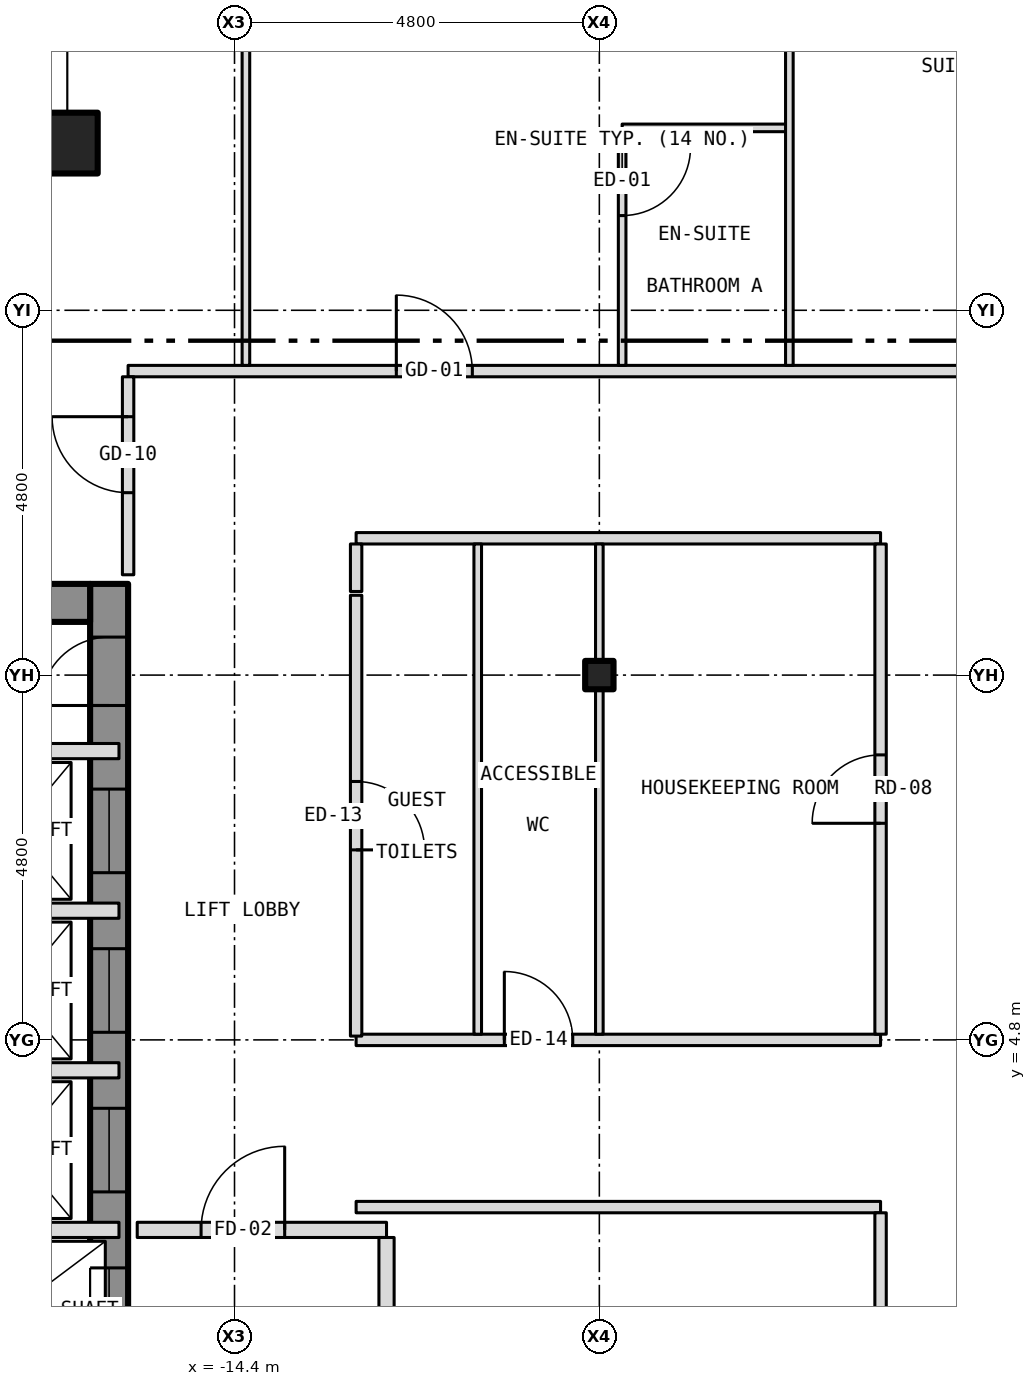
"""IFC4 building model, lengths in metres.
Left out: names, types, materials, properties, quantities, classifications, styles, units other than length and angle.
Written with IfcOpenShell. Run it as: python <this file> out.ifc"""

import sys

from ifc_helpers import new_model, si_unit, direction, frame, frame_2d, origin, origin_2d, place, context, subcontext, project, spatial, rectangle, hollow_rectangle, i_section, extrude, element, fill, save


model = new_model("IFC4")
c1 = context("Model", 3, precision=1e-05, world=origin(), true_north=direction((0.0, 1.0)))
c2 = subcontext(c1, "Body", "Model", "MODEL_VIEW")
j1 = project(units=[si_unit("LENGTHUNIT", "METRE"), si_unit("PLANEANGLEUNIT", "RADIAN")], contexts=[c1])
p1 = place(None, origin())
s1 = spatial("IfcSite", under=j1, at=p1, CompositionType="ELEMENT")
p2 = place(p1, origin())
s2 = spatial("IfcBuilding", under=s1, at=p2, CompositionType="ELEMENT")
p3 = place(p2, frame((0.0, 0.0, 151.5)))
s3 = spatial("IfcBuildingStorey", under=s2, at=p3, CompositionType="ELEMENT", Elevation=151.5)
p4 = place(p3, frame((-16.6, 16.6, -0.15), z_axis=(0.0, 0.0, 1.0), x_axis=(1.0, 0.0, 0.0)))
e1 = element("IfcColumn", 1, at=p4, inside=s3, PredefinedType="COLUMN", context=c2, shape_type="SweptSolid", body=[
    extrude(hollow_rectangle(XDim=0.8, YDim=0.8, WallThickness=0.045, at=origin_2d()), origin(), (0.0, 0.0, 1.0), 3.5),
])
p5 = place(p3, frame((-9.6, 9.6, -0.15), z_axis=(0.0, 0.0, 1.0), x_axis=(1.0, 0.0, 0.0)))
e2 = element("IfcColumn", 2, at=p5, inside=s3, PredefinedType="COLUMN", context=c2, shape_type="SweptSolid", body=[
    extrude(i_section(OverallWidth=0.373, OverallDepth=0.373, WebThickness=0.016, FlangeThickness=0.026, at=origin_2d()), origin(), (0.0, 0.0, 1.0), 3.5),
])
p6 = place(p3, frame((-16.05, -10.8, 0.0), z_axis=(0.0, 0.0, 1.0), x_axis=(0.0, 1.0, 0.0)))
e3 = element("IfcWall", 3, at=p6, inside=s3, PredefinedType="SHEAR", context=c2, shape_type="SweptSolid", body=[
    extrude(rectangle(XDim=21.6, YDim=0.5, at=frame_2d((10.8, 0.0))), origin(), (0.0, 0.0, 1.0), 3.25),
])
p7 = place(p6, frame((9.4, 0.0, 0.0)))
e4 = element("IfcOpeningElement", 4, at=p7, cuts=e3, PredefinedType="OPENING", context=c2, shape_type="SweptSolid", body=[
    extrude(rectangle(XDim=1.1, YDim=2.1, at=frame_2d((0.55, 1.05))), frame((0.0, 0.262, 0.0), z_axis=(0.0, -1.0, 0.0), x_axis=(1.0, 0.0, 0.0)), (0.0, 0.0, 1.0), 0.524),
])
p8 = place(p6, frame((11.5, 0.0, 0.0)))
e5 = element("IfcOpeningElement", 5, at=p8, cuts=e3, PredefinedType="OPENING", context=c2, shape_type="SweptSolid", body=[
    extrude(rectangle(XDim=1.1, YDim=2.1, at=frame_2d((0.55, 1.05))), frame((0.0, 0.262, 0.0), z_axis=(0.0, -1.0, 0.0), x_axis=(1.0, 0.0, 0.0)), (0.0, 0.0, 1.0), 0.524),
])
p9 = place(p6, frame((13.6, 0.0, 0.0)))
e6 = element("IfcOpeningElement", 6, at=p9, cuts=e3, PredefinedType="OPENING", context=c2, shape_type="SweptSolid", body=[
    extrude(rectangle(XDim=1.1, YDim=2.1, at=frame_2d((0.55, 1.05))), frame((0.0, 0.262, 0.0), z_axis=(0.0, -1.0, 0.0), x_axis=(1.0, 0.0, 0.0)), (0.0, 0.0, 1.0), 0.524),
])
p10 = place(p6, frame((15.7, 0.0, 0.0)))
e7 = element("IfcOpeningElement", 7, at=p10, cuts=e3, PredefinedType="OPENING", context=c2, shape_type="SweptSolid", body=[
    extrude(rectangle(XDim=1.1, YDim=2.1, at=frame_2d((0.55, 1.05))), frame((0.0, 0.262, 0.0), z_axis=(0.0, -1.0, 0.0), x_axis=(1.0, 0.0, 0.0)), (0.0, 0.0, 1.0), 0.524),
])
p11 = place(p6, frame((17.8, 0.0, 0.0)))
e8 = element("IfcOpeningElement", 8, at=p11, cuts=e3, PredefinedType="OPENING", context=c2, shape_type="SweptSolid", body=[
    extrude(rectangle(XDim=1.1, YDim=2.1, at=frame_2d((0.55, 1.05))), frame((0.0, 0.262, 0.0), z_axis=(0.0, -1.0, 0.0), x_axis=(1.0, 0.0, 0.0)), (0.0, 0.0, 1.0), 0.524),
])
p12 = place(p6, frame((0.758, 0.0, 0.0)))
e9 = element("IfcOpeningElement", 9, at=p12, cuts=e3, PredefinedType="OPENING", context=c2, shape_type="SweptSolid", body=[
    extrude(rectangle(XDim=1.1, YDim=2.1, at=frame_2d((0.55, 1.05))), frame((0.0, 0.262, 0.0), z_axis=(0.0, -1.0, 0.0), x_axis=(1.0, 0.0, 0.0)), (0.0, 0.0, 1.0), 0.524),
])
p13 = place(p6, frame((7.5, 0.0, 0.0)))
e10 = element("IfcOpeningElement", 10, at=p13, cuts=e3, PredefinedType="OPENING", context=c2, shape_type="SweptSolid", body=[
    extrude(rectangle(XDim=1.1, YDim=2.1, at=frame_2d((0.55, 1.05))), frame((0.0, 0.262, 0.0), z_axis=(0.0, -1.0, 0.0), x_axis=(1.0, 0.0, 0.0)), (0.0, 0.0, 1.0), 0.524),
])
p14 = place(p6, frame((20.0, 0.0, 0.0)))
e11 = element("IfcOpeningElement", 11, at=p14, cuts=e3, PredefinedType="OPENING", context=c2, shape_type="SweptSolid", body=[
    extrude(rectangle(XDim=0.9, YDim=2.1, at=frame_2d((0.45, 1.05))), frame((0.0, 0.262, 0.0), z_axis=(0.0, -1.0, 0.0), x_axis=(1.0, 0.0, 0.0)), (0.0, 0.0, 1.0), 0.524),
])
p15 = place(p3, frame((-21.1, 10.55, 0.0), z_axis=(0.0, 0.0, 1.0), x_axis=(1.0, 0.0, 0.0)))
e12 = element("IfcWall", 12, at=p15, inside=s3, PredefinedType="SHEAR", context=c2, shape_type="SweptSolid", body=[
    extrude(rectangle(XDim=4.8, YDim=0.5, at=frame_2d((2.4, 0.0))), origin(), (0.0, 0.0, 1.0), 3.25),
])
p16 = place(p3, frame((-18.8, 2.3, 0.0), z_axis=(0.0, 0.0, 1.0), x_axis=(1.0, 0.0, 0.0)))
e13 = element("IfcWall", 13, at=p16, inside=s3, PredefinedType="PARTITIONING", context=c2, shape_type="SweptSolid", body=[
    extrude(rectangle(XDim=2.88, YDim=0.2, at=frame_2d((1.44, 0.0))), origin(), (0.0, 0.0, 1.0), 3.25),
])
p17 = place(p3, frame((-15.68, 2.3, 0.0), z_axis=(0.0, 0.0, 1.0), x_axis=(1.0, 0.0, 0.0)))
e14 = element("IfcWall", 14, at=p17, inside=s3, PredefinedType="PARTITIONING", context=c2, shape_type="SweptSolid", body=[
    extrude(rectangle(XDim=3.28, YDim=0.2, at=frame_2d((1.64, 0.0))), origin(), (0.0, 0.0, 1.0), 3.35),
])
p18 = place(p17, frame((0.84, 0.0, 0.0)))
e15 = element("IfcOpeningElement", 15, at=p18, cuts=e14, PredefinedType="OPENING", context=c2, shape_type="SweptSolid", body=[
    extrude(rectangle(XDim=1.1, YDim=2.1, at=frame_2d((0.55, 1.05))), frame((0.0, 0.112, 0.0), z_axis=(0.0, -1.0, 0.0), x_axis=(1.0, 0.0, 0.0)), (0.0, 0.0, 1.0), 0.224),
])
p19 = place(p3, frame((-12.8, 2.6, 0.0), z_axis=(0.0, 0.0, 1.0), x_axis=(1.0, 0.0, 0.0)))
e16 = element("IfcWall", 16, at=p19, inside=s3, PredefinedType="PARTITIONING", context=c2, shape_type="SweptSolid", body=[
    extrude(rectangle(XDim=6.9, YDim=0.15, at=frame_2d((3.45, 0.0))), origin(), (0.0, 0.0, 1.0), 3.35),
])
p20 = place(p3, frame((-18.8, 4.4, 0.0), z_axis=(0.0, 0.0, 1.0), x_axis=(1.0, 0.0, 0.0)))
e17 = element("IfcWall", 17, at=p20, inside=s3, PredefinedType="PARTITIONING", context=c2, shape_type="SweptSolid", body=[
    extrude(rectangle(XDim=2.88, YDim=0.2, at=frame_2d((1.44, 0.0))), origin(), (0.0, 0.0, 1.0), 3.25),
])
p21 = place(p3, frame((-12.8, 4.8, 0.0), z_axis=(0.0, 0.0, 1.0), x_axis=(1.0, 0.0, 0.0)))
e18 = element("IfcWall", 18, at=p21, inside=s3, PredefinedType="PARTITIONING", context=c2, shape_type="SweptSolid", body=[
    extrude(rectangle(XDim=6.9, YDim=0.15, at=frame_2d((3.45, 0.0))), origin(), (0.0, 0.0, 1.0), 3.35),
])
p22 = place(p21, frame((1.95, 0.0, 0.0)))
e19 = element("IfcOpeningElement", 19, at=p22, cuts=e18, PredefinedType="OPENING", context=c2, shape_type="SweptSolid", body=[
    extrude(rectangle(XDim=0.9, YDim=2.1, at=frame_2d((0.45, 1.05))), frame((0.0, 0.087, 0.0), z_axis=(0.0, -1.0, 0.0), x_axis=(1.0, 0.0, 0.0)), (0.0, 0.0, 1.0), 0.174),
])
p23 = place(p3, frame((-18.8, 6.5, 0.0), z_axis=(0.0, 0.0, 1.0), x_axis=(1.0, 0.0, 0.0)))
e20 = element("IfcWall", 20, at=p23, inside=s3, PredefinedType="PARTITIONING", context=c2, shape_type="SweptSolid", body=[
    extrude(rectangle(XDim=2.88, YDim=0.2, at=frame_2d((1.44, 0.0))), origin(), (0.0, 0.0, 1.0), 3.25),
])
p24 = place(p3, frame((-21.48, 8.6, 0.0), z_axis=(0.0, 0.0, 1.0), x_axis=(1.0, 0.0, 0.0)))
e21 = element("IfcWall", 21, at=p24, inside=s3, PredefinedType="PARTITIONING", context=c2, shape_type="SweptSolid", body=[
    extrude(rectangle(XDim=5.56, YDim=0.2, at=frame_2d((2.78, 0.0))), origin(), (0.0, 0.0, 1.0), 3.25),
])
p25 = place(p3, frame((-12.8, 11.4, 0.0), z_axis=(0.0, 0.0, 1.0), x_axis=(1.0, 0.0, 0.0)))
e22 = element("IfcWall", 22, at=p25, inside=s3, PredefinedType="PARTITIONING", context=c2, shape_type="SweptSolid", body=[
    extrude(rectangle(XDim=6.9, YDim=0.15, at=frame_2d((3.45, 0.0))), origin(), (0.0, 0.0, 1.0), 3.35),
])
p26 = place(p3, frame((-15.8, 13.6, 0.0), z_axis=(0.0, 0.0, 1.0), x_axis=(1.0, 0.0, 0.0)))
e23 = element("IfcWall", 23, at=p26, inside=s3, PredefinedType="PARTITIONING", context=c2, shape_type="SweptSolid", body=[
    extrude(rectangle(XDim=31.6, YDim=0.15, at=frame_2d((15.8, 0.0))), origin(), (0.0, 0.0, 1.0), 3.35),
])
p27 = place(p26, frame((3.529, 0.0, 0.0)))
e24 = element("IfcOpeningElement", 24, at=p27, cuts=e23, PredefinedType="OPENING", context=c2, shape_type="SweptSolid", body=[
    extrude(rectangle(XDim=1.0, YDim=2.1, at=frame_2d((0.5, 1.05))), frame((0.0, 0.087, 0.0), z_axis=(0.0, -1.0, 0.0), x_axis=(1.0, 0.0, 0.0)), (0.0, 0.0, 1.0), 0.174),
])
p28 = place(p26, frame((11.388, 0.0, 0.0)))
e25 = element("IfcOpeningElement", 25, at=p28, cuts=e23, PredefinedType="OPENING", context=c2, shape_type="SweptSolid", body=[
    extrude(rectangle(XDim=1.0, YDim=2.1, at=frame_2d((0.5, 1.05))), frame((0.0, 0.087, 0.0), z_axis=(0.0, -1.0, 0.0), x_axis=(1.0, 0.0, 0.0)), (0.0, 0.0, 1.0), 0.174),
])
p29 = place(p26, frame((24.872, 0.0, 0.0)))
e26 = element("IfcOpeningElement", 26, at=p29, cuts=e23, PredefinedType="OPENING", context=c2, shape_type="SweptSolid", body=[
    extrude(rectangle(XDim=1.0, YDim=2.1, at=frame_2d((0.5, 1.05))), frame((0.0, 0.087, 0.0), z_axis=(0.0, -1.0, 0.0), x_axis=(1.0, 0.0, 0.0)), (0.0, 0.0, 1.0), 0.174),
])
p30 = place(p3, frame((-9.3, 16.8, 0.0), z_axis=(0.0, 0.0, 1.0), x_axis=(1.0, 0.0, 0.0)))
e27 = element("IfcWall", 27, at=p30, inside=s3, PredefinedType="PARTITIONING", context=c2, shape_type="SweptSolid", body=[
    extrude(rectangle(XDim=2.2, YDim=0.1, at=frame_2d((1.1, 0.0))), origin(), (0.0, 0.0, 1.0), 3.35),
])
p31 = place(p3, frame((-15.8, 10.92, 0.0), z_axis=(0.0, 0.0, 1.0), x_axis=(0.0, 1.0, 0.0)))
e28 = element("IfcWall", 28, at=p31, inside=s3, PredefinedType="PARTITIONING", context=c2, shape_type="SweptSolid", body=[
    extrude(rectangle(XDim=2.605, YDim=0.15, at=frame_2d((1.302, 0.0))), origin(), (0.0, 0.0, 1.0), 3.35),
])
p32 = place(p31, frame((1.08, 0.0, 0.0)))
e29 = element("IfcOpeningElement", 29, at=p32, cuts=e28, PredefinedType="OPENING", context=c2, shape_type="SweptSolid", body=[
    extrude(rectangle(XDim=1.0, YDim=2.1, at=frame_2d((0.5, 1.05))), frame((0.0, 0.087, 0.0), z_axis=(0.0, -1.0, 0.0), x_axis=(1.0, 0.0, 0.0)), (0.0, 0.0, 1.0), 0.174),
])
p33 = place(p3, frame((-14.25, 13.675, 0.0), z_axis=(0.0, 0.0, 1.0), x_axis=(0.0, 1.0, 0.0)))
e30 = element("IfcWall", 30, at=p33, inside=s3, PredefinedType="PARTITIONING", context=c2, shape_type="SweptSolid", body=[
    extrude(rectangle(XDim=8.355, YDim=0.1, at=frame_2d((4.177, 0.0))), origin(), (0.0, 0.0, 1.0), 2.817),
])
p34 = place(p3, frame((-12.8, 4.85, 0.0), z_axis=(0.0, 0.0, 1.0), x_axis=(0.0, 1.0, 0.0)))
e31 = element("IfcWall", 31, at=p34, inside=s3, PredefinedType="PARTITIONING", context=c2, shape_type="SweptSolid", body=[
    extrude(rectangle(XDim=5.8, YDim=0.15, at=frame_2d((2.9, 0.0))), origin(), (0.0, 0.0, 1.0), 3.35),
])
p35 = place(p34, frame((2.45, 0.0, 0.0)))
e32 = element("IfcOpeningElement", 32, at=p35, cuts=e31, PredefinedType="OPENING", context=c2, shape_type="SweptSolid", body=[
    extrude(rectangle(XDim=0.9, YDim=2.1, at=frame_2d((0.45, 1.05))), frame((0.0, 0.087, 0.0), z_axis=(0.0, -1.0, 0.0), x_axis=(1.0, 0.0, 0.0)), (0.0, 0.0, 1.0), 0.174),
])
p36 = place(p3, frame((-12.8, 10.7, 0.0), z_axis=(0.0, 0.0, 1.0), x_axis=(0.0, 1.0, 0.0)))
e33 = element("IfcWall", 33, at=p36, inside=s3, PredefinedType="PARTITIONING", context=c2, shape_type="SweptSolid", body=[
    extrude(rectangle(XDim=0.625, YDim=0.15, at=frame_2d((0.312, 0.0))), origin(), (0.0, 0.0, 1.0), 3.35),
])
p37 = place(p3, frame((-12.4, -1.8, 0.0), z_axis=(0.0, 0.0, 1.0), x_axis=(0.0, 1.0, 0.0)))
e34 = element("IfcWall", 34, at=p37, inside=s3, PredefinedType="PARTITIONING", context=c2, shape_type="SweptSolid", body=[
    extrude(rectangle(XDim=4.0, YDim=0.2, at=frame_2d((2.0, 0.0))), origin(), (0.0, 0.0, 1.0), 3.35),
])
p38 = place(p3, frame((-11.2, 4.875, 0.0), z_axis=(0.0, 0.0, 1.0), x_axis=(0.0, 1.0, 0.0)))
e35 = element("IfcWall", 35, at=p38, inside=s3, PredefinedType="PARTITIONING", context=c2, shape_type="SweptSolid", body=[
    extrude(rectangle(XDim=6.45, YDim=0.1, at=frame_2d((3.225, 0.0))), origin(), (0.0, 0.0, 1.0), 3.35),
])
p39 = place(p3, frame((-9.6, 4.875, 0.0), z_axis=(0.0, 0.0, 1.0), x_axis=(0.0, 1.0, 0.0)))
e36 = element("IfcWall", 36, at=p39, inside=s3, PredefinedType="PARTITIONING", context=c2, shape_type="SweptSolid", body=[
    extrude(rectangle(XDim=4.538, YDim=0.1, at=frame_2d((2.269, 0.0))), origin(), (0.0, 0.0, 1.0), 2.728),
])
p40 = place(p3, frame((-9.6, 9.413, 0.0), z_axis=(0.0, 0.0, 1.0), x_axis=(0.0, 1.0, 0.0)))
e37 = element("IfcWall", 37, at=p40, inside=s3, PredefinedType="PARTITIONING", context=c2, shape_type="SweptSolid", body=[
    extrude(rectangle(XDim=0.374, YDim=0.1, at=frame_2d((0.187, 0.0))), origin(), (0.0, 0.0, 1.0), 3.35),
])
p41 = place(p3, frame((-9.6, 9.787, 0.0), z_axis=(0.0, 0.0, 1.0), x_axis=(0.0, 1.0, 0.0)))
e38 = element("IfcWall", 38, at=p41, inside=s3, PredefinedType="PARTITIONING", context=c2, shape_type="SweptSolid", body=[
    extrude(rectangle(XDim=1.538, YDim=0.1, at=frame_2d((0.769, 0.0))), origin(), (0.0, 0.0, 1.0), 2.728),
])
p42 = place(p3, frame((-9.3, 13.675, 0.0), z_axis=(0.0, 0.0, 1.0), x_axis=(0.0, 1.0, 0.0)))
e39 = element("IfcWall", 39, at=p42, inside=s3, PredefinedType="PARTITIONING", context=c2, shape_type="SweptSolid", body=[
    extrude(rectangle(XDim=3.075, YDim=0.1, at=frame_2d((1.538, 0.0))), origin(), (0.0, 0.0, 1.0), 3.35),
])
p43 = place(p42, frame((1.971, 0.0, 0.0)))
e40 = element("IfcOpeningElement", 40, at=p43, cuts=e39, PredefinedType="OPENING", context=c2, shape_type="SweptSolid", body=[
    extrude(rectangle(XDim=0.9, YDim=2.1, at=frame_2d((0.45, 1.05))), frame((0.0, 0.062, 0.0), z_axis=(0.0, -1.0, 0.0), x_axis=(1.0, 0.0, 0.0)), (0.0, 0.0, 1.0), 0.124),
])
p44 = place(p3, frame((-7.1, 13.675, 0.0), z_axis=(0.0, 0.0, 1.0), x_axis=(0.0, 1.0, 0.0)))
e41 = element("IfcWall", 41, at=p44, inside=s3, PredefinedType="PARTITIONING", context=c2, shape_type="SweptSolid", body=[
    extrude(rectangle(XDim=7.805, YDim=0.1, at=frame_2d((3.902, 0.0))), origin(), (0.0, 0.0, 1.0), 3.35),
])
p45 = place(p3, frame((-5.9, -11.325, 0.0), z_axis=(0.0, 0.0, 1.0), x_axis=(0.0, 1.0, 0.0)))
e42 = element("IfcWall", 42, at=p45, inside=s3, PredefinedType="PARTITIONING", context=c2, shape_type="SweptSolid", body=[
    extrude(rectangle(XDim=13.85, YDim=0.15, at=frame_2d((6.925, 0.0))), origin(), (0.0, 0.0, 1.0), 3.35),
])
p46 = place(p45, frame((6.475, 0.0, 0.0)))
e43 = element("IfcOpeningElement", 43, at=p46, cuts=e42, PredefinedType="OPENING", context=c2, shape_type="SweptSolid", body=[
    extrude(rectangle(XDim=0.9, YDim=2.1, at=frame_2d((0.45, 1.05))), frame((0.0, 0.087, 0.0), z_axis=(0.0, -1.0, 0.0), x_axis=(1.0, 0.0, 0.0)), (0.0, 0.0, 1.0), 0.174),
])
p47 = place(p3, frame((-5.9, 4.875, 0.0), z_axis=(0.0, 0.0, 1.0), x_axis=(0.0, 1.0, 0.0)))
e44 = element("IfcWall", 44, at=p47, inside=s3, PredefinedType="PARTITIONING", context=c2, shape_type="SweptSolid", body=[
    extrude(rectangle(XDim=6.45, YDim=0.15, at=frame_2d((3.225, 0.0))), origin(), (0.0, 0.0, 1.0), 3.35),
])
p48 = place(p47, frame((2.775, 0.0, 0.0)))
e45 = element("IfcOpeningElement", 45, at=p48, cuts=e44, PredefinedType="OPENING", context=c2, shape_type="SweptSolid", body=[
    extrude(rectangle(XDim=0.9, YDim=2.1, at=frame_2d((0.45, 1.05))), frame((0.0, 0.087, 0.0), z_axis=(0.0, -1.0, 0.0), x_axis=(1.0, 0.0, 0.0)), (0.0, 0.0, 1.0), 0.174),
])
p49 = place(p8, origin())
e46 = element("IfcDoor", 46, at=p49, inside=s3, OperationType="SLIDING_TO_LEFT", PredefinedType="DOOR", context=c2, shape_type="SweptSolid", body=[
    extrude(rectangle(XDim=1.1, YDim=2.1, at=frame_2d((0.55, 1.05))), frame((0.0, 0.025, 0.0), z_axis=(0.0, -1.0, 0.0), x_axis=(1.0, 0.0, 0.0)), (0.0, 0.0, 1.0), 0.05),
])
fill(e5, e46)
p50 = place(p9, origin())
e47 = element("IfcDoor", 47, at=p50, inside=s3, OperationType="SLIDING_TO_LEFT", PredefinedType="DOOR", context=c2, shape_type="SweptSolid", body=[
    extrude(rectangle(XDim=1.1, YDim=2.1, at=frame_2d((0.55, 1.05))), frame((0.0, 0.025, 0.0), z_axis=(0.0, -1.0, 0.0), x_axis=(1.0, 0.0, 0.0)), (0.0, 0.0, 1.0), 0.05),
])
fill(e6, e47)
p51 = place(p10, origin())
e48 = element("IfcDoor", 48, at=p51, inside=s3, OperationType="SLIDING_TO_LEFT", PredefinedType="DOOR", context=c2, shape_type="SweptSolid", body=[
    extrude(rectangle(XDim=1.1, YDim=2.1, at=frame_2d((0.55, 1.05))), frame((0.0, 0.025, 0.0), z_axis=(0.0, -1.0, 0.0), x_axis=(1.0, 0.0, 0.0)), (0.0, 0.0, 1.0), 0.05),
])
fill(e7, e48)
p52 = place(p11, origin())
e49 = element("IfcDoor", 49, at=p52, inside=s3, OperationType="SLIDING_TO_LEFT", PredefinedType="DOOR", context=c2, shape_type="SweptSolid", body=[
    extrude(rectangle(XDim=1.1, YDim=2.1, at=frame_2d((0.55, 1.05))), frame((0.0, 0.025, 0.0), z_axis=(0.0, -1.0, 0.0), x_axis=(1.0, 0.0, 0.0)), (0.0, 0.0, 1.0), 0.05),
])
fill(e8, e49)
p53 = place(p14, origin())
e50 = element("IfcDoor", 50, at=p53, inside=s3, OperationType="SINGLE_SWING_LEFT", PredefinedType="DOOR", context=c2, shape_type="SweptSolid", body=[
    extrude(rectangle(XDim=0.9, YDim=2.1, at=frame_2d((0.45, 1.05))), frame((0.0, 0.025, 0.0), z_axis=(0.0, -1.0, 0.0), x_axis=(1.0, 0.0, 0.0)), (0.0, 0.0, 1.0), 0.05),
])
fill(e11, e50)
p54 = place(p18, origin())
e51 = element("IfcDoor", 51, at=p54, inside=s3, OperationType="SINGLE_SWING_RIGHT", PredefinedType="DOOR", context=c2, shape_type="SweptSolid", body=[
    extrude(rectangle(XDim=1.1, YDim=2.1, at=frame_2d((0.55, 1.05))), frame((0.0, 0.025, 0.0), z_axis=(0.0, -1.0, 0.0), x_axis=(1.0, 0.0, 0.0)), (0.0, 0.0, 1.0), 0.05),
])
fill(e15, e51)
p55 = place(p27, origin())
e52 = element("IfcDoor", 52, at=p55, inside=s3, OperationType="SINGLE_SWING_LEFT", PredefinedType="DOOR", context=c2, shape_type="SweptSolid", body=[
    extrude(rectangle(XDim=1.0, YDim=2.1, at=frame_2d((0.5, 1.05))), frame((0.0, 0.025, 0.0), z_axis=(0.0, -1.0, 0.0), x_axis=(1.0, 0.0, 0.0)), (0.0, 0.0, 1.0), 0.05),
])
fill(e24, e52)
p56 = place(p43, origin())
e53 = element("IfcDoor", 53, at=p56, inside=s3, OperationType="SINGLE_SWING_RIGHT", PredefinedType="DOOR", context=c2, shape_type="SweptSolid", body=[
    extrude(rectangle(XDim=0.9, YDim=2.1, at=frame_2d((0.45, 1.05))), frame((0.0, 0.025, 0.0), z_axis=(0.0, -1.0, 0.0), x_axis=(1.0, 0.0, 0.0)), (0.0, 0.0, 1.0), 0.05),
])
fill(e40, e53)
p57 = place(p32, origin())
e54 = element("IfcDoor", 54, at=p57, inside=s3, OperationType="SINGLE_SWING_RIGHT", PredefinedType="DOOR", context=c2, shape_type="SweptSolid", body=[
    extrude(rectangle(XDim=1.0, YDim=2.1, at=frame_2d((0.5, 1.05))), frame((0.0, 0.025, 0.0), z_axis=(0.0, -1.0, 0.0), x_axis=(1.0, 0.0, 0.0)), (0.0, 0.0, 1.0), 0.05),
])
fill(e29, e54)
p58 = place(p35, origin())
e55 = element("IfcDoor", 55, at=p58, inside=s3, OperationType="SINGLE_SWING_LEFT", PredefinedType="DOOR", context=c2, shape_type="SweptSolid", body=[
    extrude(rectangle(XDim=0.9, YDim=2.1, at=frame_2d((0.45, 1.05))), frame((0.0, 0.025, 0.0), z_axis=(0.0, -1.0, 0.0), x_axis=(1.0, 0.0, 0.0)), (0.0, 0.0, 1.0), 0.05),
])
fill(e32, e55)
p59 = place(p22, origin())
e56 = element("IfcDoor", 56, at=p59, inside=s3, OperationType="SINGLE_SWING_LEFT", PredefinedType="DOOR", context=c2, shape_type="SweptSolid", body=[
    extrude(rectangle(XDim=0.9, YDim=2.1, at=frame_2d((0.45, 1.05))), frame((0.0, 0.025, 0.0), z_axis=(0.0, -1.0, 0.0), x_axis=(1.0, 0.0, 0.0)), (0.0, 0.0, 1.0), 0.05),
])
fill(e19, e56)
p60 = place(p48, origin())
e57 = element("IfcDoor", 57, at=p60, inside=s3, OperationType="SINGLE_SWING_LEFT", PredefinedType="DOOR", context=c2, shape_type="SweptSolid", body=[
    extrude(rectangle(XDim=0.9, YDim=2.1, at=frame_2d((0.45, 1.05))), frame((0.0, 0.025, 0.0), z_axis=(0.0, -1.0, 0.0), x_axis=(1.0, 0.0, 0.0)), (0.0, 0.0, 1.0), 0.05),
])
fill(e45, e57)
save(model, sys.argv[1])
